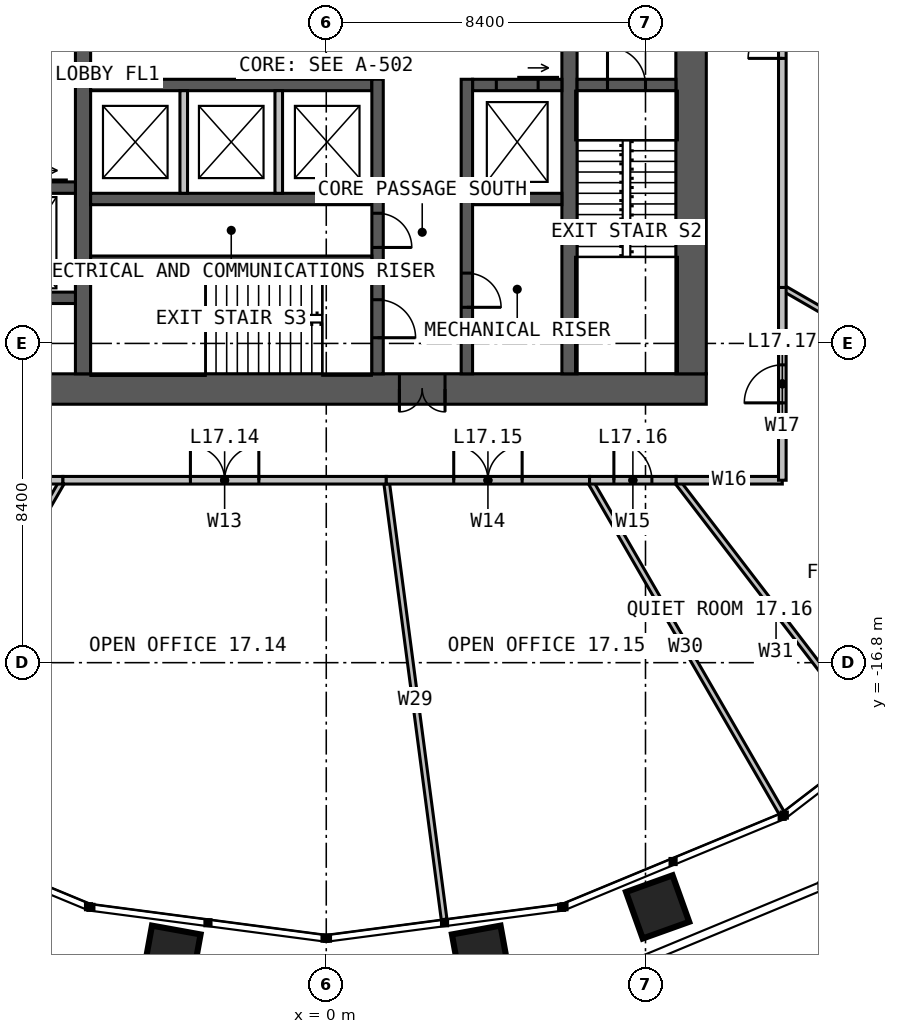
"""IFC4 building model, lengths in metres.
Left out: names, types, materials, properties, quantities, classifications, styles, units other than length and angle.
Written with IfcOpenShell. Run it as: python <this file> out.ifc"""

import sys

from ifc_helpers import new_model, si_unit, direction, frame, frame_2d, origin, place, context, subcontext, project, spatial, rectangle, extrude, element, fill, save


model = new_model("IFC4")
c1 = context("Model", 3, precision=1e-05, world=origin(), true_north=direction((0.0, 1.0)))
c2 = subcontext(c1, "Body", "Model", "MODEL_VIEW")
j1 = project(units=[si_unit("LENGTHUNIT", "METRE"), si_unit("PLANEANGLEUNIT", "RADIAN")], contexts=[c1])
p1 = place(None, origin())
s1 = spatial("IfcSite", under=j1, at=p1, CompositionType="ELEMENT")
p2 = place(p1, origin())
s2 = spatial("IfcBuilding", under=s1, at=p2, CompositionType="ELEMENT")
p3 = place(p2, frame((0.0, 0.0, 73.0)))
s3 = spatial("IfcBuildingStorey", under=s2, at=p3, CompositionType="ELEMENT", Elevation=73.0)
p4 = place(p3, frame((10.0, -9.6, 0.0), z_axis=(0.0, 0.0, 1.0), x_axis=(-1.0, 0.0, 0.0)))
e1 = element("IfcWall", 1, at=p4, inside=s3, PredefinedType="SOLIDWALL", context=c2, shape_type="SweptSolid", body=[
    extrude(rectangle(XDim=20.0, YDim=0.8, at=frame_2d((10.0, 0.0))), origin(), (0.0, 0.0, 1.0), 4.0),
])
p5 = place(p4, frame((6.875, 0.0, 0.0)))
e2 = element("IfcOpeningElement", 2, at=p5, cuts=e1, PredefinedType="OPENING", context=c2, shape_type="SweptSolid", body=[
    extrude(rectangle(XDim=1.2, YDim=2.2, at=frame_2d((0.6, 1.1))), frame((0.0, 0.41, 0.0), z_axis=(0.0, -1.0, 0.0), x_axis=(1.0, 0.0, 0.0)), (0.0, 0.0, 1.0), 0.82),
])
p6 = place(p3, frame((9.6, -9.2, 0.0), z_axis=(0.0, 0.0, 1.0), x_axis=(0.0, 1.0, 0.0)))
e3 = element("IfcWall", 3, at=p6, inside=s3, PredefinedType="SOLIDWALL", context=c2, shape_type="SweptSolid", body=[
    extrude(rectangle(XDim=18.4, YDim=0.8, at=frame_2d((9.2, 0.0))), origin(), (0.0, 0.0, 1.0), 4.0),
])
p7 = place(p3, frame((-6.4, -9.2, 0.0), z_axis=(0.0, 0.0, 1.0), x_axis=(0.0, 1.0, 0.0)))
e4 = element("IfcWall", 4, at=p7, inside=s3, PredefinedType="SOLIDWALL", context=c2, shape_type="SweptSolid", body=[
    extrude(rectangle(XDim=18.4, YDim=0.4, at=frame_2d((9.2, 0.0))), origin(), (0.0, 0.0, 1.0), 4.0),
])
p8 = place(p7, frame((8.7, 0.0, 0.0)))
e5 = element("IfcOpeningElement", 5, at=p8, cuts=e4, PredefinedType="OPENING", context=c2, shape_type="SweptSolid", body=[
    extrude(rectangle(XDim=1.0, YDim=2.2, at=frame_2d((0.5, 1.1))), frame((0.0, 0.21, 0.0), z_axis=(0.0, -1.0, 0.0), x_axis=(1.0, 0.0, 0.0)), (0.0, 0.0, 1.0), 0.42),
])
p9 = place(p3, frame((6.4, 9.2, 0.0), z_axis=(0.0, 0.0, 1.0), x_axis=(0.0, -1.0, 0.0)))
e6 = element("IfcWall", 6, at=p9, inside=s3, PredefinedType="SOLIDWALL", context=c2, shape_type="SweptSolid", body=[
    extrude(rectangle(XDim=18.4, YDim=0.4, at=frame_2d((9.2, 0.0))), origin(), (0.0, 0.0, 1.0), 4.0),
])
p10 = place(p9, frame((8.7, 0.0, 0.0)))
e7 = element("IfcOpeningElement", 7, at=p10, cuts=e6, PredefinedType="OPENING", context=c2, shape_type="SweptSolid", body=[
    extrude(rectangle(XDim=1.0, YDim=2.2, at=frame_2d((0.5, 1.1))), frame((0.0, 0.21, 0.0), z_axis=(0.0, -1.0, 0.0), x_axis=(1.0, 0.0, 0.0)), (0.0, 0.0, 1.0), 0.42),
])
p11 = place(p3, frame((-6.2, -1.6, 0.0), z_axis=(0.0, 0.0, 1.0), x_axis=(1.0, 0.0, 0.0)))
e8 = element("IfcWall", 8, at=p11, inside=s3, PredefinedType="SOLIDWALL", context=c2, shape_type="SweptSolid", body=[
    extrude(rectangle(XDim=7.4, YDim=0.3, at=frame_2d((3.7, 0.0))), origin(), (0.0, 0.0, 1.0), 4.0),
])
p12 = place(p3, frame((3.85, -1.6, 0.0), z_axis=(0.0, 0.0, 1.0), x_axis=(1.0, 0.0, 0.0)))
e9 = element("IfcWall", 9, at=p12, inside=s3, PredefinedType="SOLIDWALL", context=c2, shape_type="SweptSolid", body=[
    extrude(rectangle(XDim=2.35, YDim=0.3, at=frame_2d((1.175, 0.0))), origin(), (0.0, 0.0, 1.0), 4.0),
])
p13 = place(p12, frame((0.625, 0.0, 0.0)))
e10 = element("IfcOpeningElement", 10, at=p13, cuts=e9, PredefinedType="OPENING", context=c2, shape_type="SweptSolid", body=[
    extrude(rectangle(XDim=1.1, YDim=2.2, at=frame_2d((0.55, 1.1))), frame((0.0, 0.16, 0.0), z_axis=(0.0, -1.0, 0.0), x_axis=(1.0, 0.0, 0.0)), (0.0, 0.0, 1.0), 0.32),
])
p14 = place(p3, frame((-6.2, -4.6, 0.0), z_axis=(0.0, 0.0, 1.0), x_axis=(1.0, 0.0, 0.0)))
e11 = element("IfcWall", 11, at=p14, inside=s3, PredefinedType="SOLIDWALL", context=c2, shape_type="SweptSolid", body=[
    extrude(rectangle(XDim=7.4, YDim=0.3, at=frame_2d((3.7, 0.0))), origin(), (0.0, 0.0, 1.0), 4.0),
])
p15 = place(p3, frame((3.85, -4.6, 0.0), z_axis=(0.0, 0.0, 1.0), x_axis=(1.0, 0.0, 0.0)))
e12 = element("IfcWall", 12, at=p15, inside=s3, PredefinedType="SOLIDWALL", context=c2, shape_type="SweptSolid", body=[
    extrude(rectangle(XDim=2.35, YDim=0.3, at=frame_2d((1.175, 0.0))), origin(), (0.0, 0.0, 1.0), 4.0),
])
p16 = place(p3, frame((1.35, -1.45, 0.0), z_axis=(0.0, 0.0, 1.0), x_axis=(0.0, -1.0, 0.0)))
e13 = element("IfcWall", 13, at=p16, inside=s3, PredefinedType="SOLIDWALL", context=c2, shape_type="SweptSolid", body=[
    extrude(rectangle(XDim=7.75, YDim=0.3, at=frame_2d((3.875, 0.0))), origin(), (0.0, 0.0, 1.0), 4.0),
])
p17 = place(p16, frame((5.8, 0.0, 0.0)))
e14 = element("IfcOpeningElement", 14, at=p17, cuts=e13, PredefinedType="OPENING", context=c2, shape_type="SweptSolid", body=[
    extrude(rectangle(XDim=1.0, YDim=2.2, at=frame_2d((0.5, 1.1))), frame((0.0, 0.16, 0.0), z_axis=(0.0, -1.0, 0.0), x_axis=(1.0, 0.0, 0.0)), (0.0, 0.0, 1.0), 0.32),
])
p18 = place(p16, frame((3.525, 0.0, 0.0)))
e15 = element("IfcOpeningElement", 15, at=p18, cuts=e13, PredefinedType="OPENING", context=c2, shape_type="SweptSolid", body=[
    extrude(rectangle(XDim=0.9, YDim=2.2, at=frame_2d((0.45, 1.1))), frame((0.0, 0.16, 0.0), z_axis=(0.0, -1.0, 0.0), x_axis=(1.0, 0.0, 0.0)), (0.0, 0.0, 1.0), 0.32),
])
p19 = place(p3, frame((3.7, -1.45, 0.0), z_axis=(0.0, 0.0, 1.0), x_axis=(0.0, -1.0, 0.0)))
e16 = element("IfcWall", 16, at=p19, inside=s3, PredefinedType="SOLIDWALL", context=c2, shape_type="SweptSolid", body=[
    extrude(rectangle(XDim=7.75, YDim=0.3, at=frame_2d((3.875, 0.0))), origin(), (0.0, 0.0, 1.0), 4.0),
])
p20 = place(p19, frame((5.1, 0.0, 0.0)))
e17 = element("IfcOpeningElement", 17, at=p20, cuts=e16, PredefinedType="OPENING", context=c2, shape_type="SweptSolid", body=[
    extrude(rectangle(XDim=0.9, YDim=2.2, at=frame_2d((0.45, 1.1))), frame((0.0, 0.16, 0.0), z_axis=(0.0, -1.0, 0.0), x_axis=(1.0, 0.0, 0.0)), (0.0, 0.0, 1.0), 0.32),
])
p21 = place(p3, frame((-6.2, -6.2, 0.0), z_axis=(0.0, 0.0, 1.0), x_axis=(1.0, 0.0, 0.0)))
e18 = element("IfcWall", 18, at=p21, inside=s3, PredefinedType="SOLIDWALL", context=c2, shape_type="SweptSolid", body=[
    extrude(rectangle(XDim=7.4, YDim=0.2, at=frame_2d((3.7, 0.0))), origin(), (0.0, 0.0, 1.0), 4.0),
])
p22 = place(p3, frame((6.6, -1.6, 0.0), z_axis=(0.0, 0.0, 1.0), x_axis=(1.0, 0.0, 0.0)))
e19 = element("IfcWall", 19, at=p22, inside=s3, PredefinedType="SOLIDWALL", context=c2, shape_type="SweptSolid", body=[
    extrude(rectangle(XDim=2.6, YDim=0.3, at=frame_2d((1.3, 0.0))), origin(), (0.0, 0.0, 1.0), 4.0),
])
p23 = place(p22, frame((0.8, 0.0, 0.0)))
e20 = element("IfcOpeningElement", 20, at=p23, cuts=e19, PredefinedType="OPENING", context=c2, shape_type="SweptSolid", body=[
    extrude(rectangle(XDim=1.0, YDim=2.2, at=frame_2d((0.5, 1.1))), frame((0.0, 0.16, 0.0), z_axis=(0.0, -1.0, 0.0), x_axis=(1.0, 0.0, 0.0)), (0.0, 0.0, 1.0), 0.32),
])
p24 = place(p3, frame((-9.2, -4.3, 0.0), z_axis=(0.0, 0.0, 1.0), x_axis=(1.0, 0.0, 0.0)))
e21 = element("IfcWall", 21, at=p24, inside=s3, PredefinedType="SOLIDWALL", context=c2, shape_type="SweptSolid", body=[
    extrude(rectangle(XDim=2.6, YDim=0.3, at=frame_2d((1.3, 0.0))), origin(), (0.0, 0.0, 1.0), 4.0),
])
p25 = place(p24, frame((0.75, 0.0, 0.0)))
e22 = element("IfcOpeningElement", 22, at=p25, cuts=e21, PredefinedType="OPENING", context=c2, shape_type="SweptSolid", body=[
    extrude(rectangle(XDim=1.1, YDim=2.2, at=frame_2d((0.55, 1.1))), frame((0.0, 0.16, 0.0), z_axis=(0.0, -1.0, 0.0), x_axis=(1.0, 0.0, 0.0)), (0.0, 0.0, 1.0), 0.32),
])
p26 = place(p3, frame((-9.2, -7.2, 0.0), z_axis=(0.0, 0.0, 1.0), x_axis=(1.0, 0.0, 0.0)))
e23 = element("IfcWall", 23, at=p26, inside=s3, PredefinedType="SOLIDWALL", context=c2, shape_type="SweptSolid", body=[
    extrude(rectangle(XDim=2.6, YDim=0.3, at=frame_2d((1.3, 0.0))), origin(), (0.0, 0.0, 1.0), 4.0),
])
for number, where, z_axis, x_axis in (
    (24, (-3.75, -1.75, 0.0), (0.0, 0.0, 1.0), (0.0, -1.0, 0.0)),
    (25, (-1.25, -1.75, 0.0), (0.0, 0.0, 1.0), (0.0, -1.0, 0.0)),
):
    element("IfcWall", number, at=place(p3, frame(where, z_axis=z_axis, x_axis=x_axis)), inside=s3, PredefinedType="SOLIDWALL", context=c2, shape_type="SweptSolid", body=[
        extrude(rectangle(XDim=2.7, YDim=0.2, at=frame_2d((1.35, 0.0))), origin(), (0.0, 0.0, 1.0), 3.75),
    ])
for number, where, z_axis, x_axis in (
    (26, (12.0, -6.928, 0.0), (0.0, 0.0, 1.0), (0.866, -0.5, 0.0)),
    (27, (-6.928, -12.0, 0.0), (0.0, 0.0, 1.0), (-0.5, -0.866, 0.0)),
):
    element("IfcWall", number, at=place(p3, frame(where, z_axis=z_axis, x_axis=x_axis)), inside=s3, PredefinedType="PARTITIONING", context=c2, shape_type="SweptSolid", body=[
        extrude(rectangle(XDim=10.106, YDim=0.15, at=frame_2d((5.053, 0.0))), origin(), (0.0, 0.0, 1.0), 2.79),
    ])
p27 = place(p3, frame((1.58, -12.0, 0.0), z_axis=(0.0, 0.0, 1.0), x_axis=(0.130516833846, -0.991446093382, 0.0)))
e28 = element("IfcWall", 28, at=p27, inside=s3, PredefinedType="PARTITIONING", context=c2, shape_type="SweptSolid", body=[
    extrude(rectangle(XDim=11.654, YDim=0.15, at=frame_2d((5.827, 0.0))), origin(), (0.0, 0.0, 1.0), 2.79),
])
p28 = place(p3, frame((6.928, -12.0, 0.0), z_axis=(0.0, 0.0, 1.0), x_axis=(0.500002673408, -0.866023860286, 0.0)))
e29 = element("IfcWall", 29, at=p28, inside=s3, PredefinedType="PARTITIONING", context=c2, shape_type="SweptSolid", body=[
    extrude(rectangle(XDim=10.106, YDim=0.15, at=frame_2d((5.053, 0.0))), origin(), (0.0, 0.0, 1.0), 2.79),
])
p29 = place(p3, frame((9.208, -12.0, 0.0), z_axis=(0.0, 0.0, 1.0), x_axis=(0.608747993403, -0.793363649613, 0.0)))
e30 = element("IfcWall", 30, at=p29, inside=s3, PredefinedType="PARTITIONING", context=c2, shape_type="SweptSolid", body=[
    extrude(rectangle(XDim=8.632, YDim=0.15, at=frame_2d((4.316, 0.0))), origin(), (0.0, 0.0, 1.0), 2.79),
])
p30 = place(p3, frame((12.0, -6.928, 0.0), z_axis=(0.0, 0.0, 1.0), x_axis=(0.0, 1.0, 0.0)))
e31 = element("IfcWall", 31, at=p30, inside=s3, PredefinedType="PARTITIONING", context=c2, shape_type="SweptSolid", body=[
    extrude(rectangle(XDim=13.856, YDim=0.2, at=frame_2d((6.928, 0.0))), origin(), (0.0, 0.0, 1.0), 3.8),
])
p31 = place(p30, frame((6.028, 0.0, 0.0)))
e32 = element("IfcOpeningElement", 32, at=p31, cuts=e31, PredefinedType="OPENING", context=c2, shape_type="SweptSolid", body=[
    extrude(rectangle(XDim=1.8, YDim=2.2, at=frame_2d((0.9, 1.1))), frame((0.0, 0.11, 0.0), z_axis=(0.0, -1.0, 0.0), x_axis=(1.0, 0.0, 0.0)), (0.0, 0.0, 1.0), 0.22),
])
p32 = place(p3, frame((-12.0, -12.0, 0.0), z_axis=(0.0, 0.0, 1.0), x_axis=(1.0, 0.0, 0.0)))
e33 = element("IfcWall", 33, at=p32, inside=s3, PredefinedType="PARTITIONING", context=c2, shape_type="SweptSolid", body=[
    extrude(rectangle(XDim=5.072, YDim=0.2, at=frame_2d((2.536, 0.0))), origin(), (0.0, 0.0, 1.0), 3.8),
])
p33 = place(p32, frame((2.036, 0.0, 0.0)))
e34 = element("IfcOpeningElement", 34, at=p33, cuts=e33, PredefinedType="OPENING", context=c2, shape_type="SweptSolid", body=[
    extrude(rectangle(XDim=1.0, YDim=2.2, at=frame_2d((0.5, 1.1))), frame((0.0, 0.11, 0.0), z_axis=(0.0, -1.0, 0.0), x_axis=(1.0, 0.0, 0.0)), (0.0, 0.0, 1.0), 0.22),
])
p34 = place(p3, frame((-6.928, -12.0, 0.0), z_axis=(0.0, 0.0, 1.0), x_axis=(1.0, 0.0, 0.0)))
e35 = element("IfcWall", 35, at=p34, inside=s3, PredefinedType="PARTITIONING", context=c2, shape_type="SweptSolid", body=[
    extrude(rectangle(XDim=8.508, YDim=0.2, at=frame_2d((4.254, 0.0))), origin(), (0.0, 0.0, 1.0), 3.8),
])
p35 = place(p34, frame((3.354, 0.0, 0.0)))
e36 = element("IfcOpeningElement", 36, at=p35, cuts=e35, PredefinedType="OPENING", context=c2, shape_type="SweptSolid", body=[
    extrude(rectangle(XDim=1.8, YDim=2.2, at=frame_2d((0.9, 1.1))), frame((0.0, 0.11, 0.0), z_axis=(0.0, -1.0, 0.0), x_axis=(1.0, 0.0, 0.0)), (0.0, 0.0, 1.0), 0.22),
])
p36 = place(p3, frame((1.58, -12.0, 0.0), z_axis=(0.0, 0.0, 1.0), x_axis=(1.0, 0.0, 0.0)))
e37 = element("IfcWall", 37, at=p36, inside=s3, PredefinedType="PARTITIONING", context=c2, shape_type="SweptSolid", body=[
    extrude(rectangle(XDim=5.348, YDim=0.2, at=frame_2d((2.674, 0.0))), origin(), (0.0, 0.0, 1.0), 3.8),
])
p37 = place(p36, frame((1.774, 0.0, 0.0)))
e38 = element("IfcOpeningElement", 38, at=p37, cuts=e37, PredefinedType="OPENING", context=c2, shape_type="SweptSolid", body=[
    extrude(rectangle(XDim=1.8, YDim=2.2, at=frame_2d((0.9, 1.1))), frame((0.0, 0.11, 0.0), z_axis=(0.0, -1.0, 0.0), x_axis=(1.0, 0.0, 0.0)), (0.0, 0.0, 1.0), 0.22),
])
p38 = place(p3, frame((6.928, -12.0, 0.0), z_axis=(0.0, 0.0, 1.0), x_axis=(1.0, 0.0, 0.0)))
e39 = element("IfcWall", 39, at=p38, inside=s3, PredefinedType="PARTITIONING", context=c2, shape_type="SweptSolid", body=[
    extrude(rectangle(XDim=2.28, YDim=0.2, at=frame_2d((1.14, 0.0))), origin(), (0.0, 0.0, 1.0), 3.8),
])
p39 = place(p38, frame((0.64, 0.0, 0.0)))
e40 = element("IfcOpeningElement", 40, at=p39, cuts=e39, PredefinedType="OPENING", context=c2, shape_type="SweptSolid", body=[
    extrude(rectangle(XDim=1.0, YDim=2.2, at=frame_2d((0.5, 1.1))), frame((0.0, 0.11, 0.0), z_axis=(0.0, -1.0, 0.0), x_axis=(1.0, 0.0, 0.0)), (0.0, 0.0, 1.0), 0.22),
])
p40 = place(p3, frame((9.208, -12.0, 0.0), z_axis=(0.0, 0.0, 1.0), x_axis=(1.0, 0.0, 0.0)))
e41 = element("IfcWall", 41, at=p40, inside=s3, PredefinedType="PARTITIONING", context=c2, shape_type="SweptSolid", body=[
    extrude(rectangle(XDim=2.792, YDim=0.2, at=frame_2d((1.396, 0.0))), origin(), (0.0, 0.0, 1.0), 3.8),
])
p41 = place(p3, frame((12.0, -12.0, 0.0), z_axis=(0.0, 0.0, 1.0), x_axis=(0.0, 1.0, 0.0)))
e42 = element("IfcWall", 42, at=p41, inside=s3, PredefinedType="PARTITIONING", context=c2, shape_type="SweptSolid", body=[
    extrude(rectangle(XDim=5.072, YDim=0.2, at=frame_2d((2.536, 0.0))), origin(), (0.0, 0.0, 1.0), 3.8),
])
p42 = place(p41, frame((2.036, 0.0, 0.0)))
e43 = element("IfcOpeningElement", 43, at=p42, cuts=e42, PredefinedType="OPENING", context=c2, shape_type="SweptSolid", body=[
    extrude(rectangle(XDim=1.0, YDim=2.2, at=frame_2d((0.5, 1.1))), frame((0.0, 0.11, 0.0), z_axis=(0.0, -1.0, 0.0), x_axis=(1.0, 0.0, 0.0)), (0.0, 0.0, 1.0), 0.22),
])
p43 = place(p5, origin())
e44 = element("IfcDoor", 44, at=p43, inside=s3, OperationType="DOUBLE_DOOR_SINGLE_SWING", PredefinedType="DOOR", context=c2, shape_type="SweptSolid", body=[
    extrude(rectangle(XDim=1.2, YDim=2.2, at=frame_2d((0.6, 1.1))), frame((0.0, 0.025, 0.0), z_axis=(0.0, -1.0, 0.0), x_axis=(1.0, 0.0, 0.0)), (0.0, 0.0, 1.0), 0.05),
])
fill(e2, e44)
p44 = place(p23, origin())
e45 = element("IfcDoor", 45, at=p44, inside=s3, OperationType="SINGLE_SWING_LEFT", PredefinedType="DOOR", context=c2, shape_type="SweptSolid", body=[
    extrude(rectangle(XDim=1.0, YDim=2.2, at=frame_2d((0.5, 1.1))), frame((0.0, 0.025, 0.0), z_axis=(0.0, -1.0, 0.0), x_axis=(1.0, 0.0, 0.0)), (0.0, 0.0, 1.0), 0.05),
])
fill(e20, e45)
p45 = place(p17, origin())
e46 = element("IfcDoor", 46, at=p45, inside=s3, OperationType="SINGLE_SWING_RIGHT", PredefinedType="DOOR", context=c2, shape_type="SweptSolid", body=[
    extrude(rectangle(XDim=1.0, YDim=2.2, at=frame_2d((0.5, 1.1))), frame((0.0, 0.025, 0.0), z_axis=(0.0, -1.0, 0.0), x_axis=(1.0, 0.0, 0.0)), (0.0, 0.0, 1.0), 0.05),
])
fill(e14, e46)
p46 = place(p18, origin())
e47 = element("IfcDoor", 47, at=p46, inside=s3, OperationType="SINGLE_SWING_RIGHT", PredefinedType="DOOR", context=c2, shape_type="SweptSolid", body=[
    extrude(rectangle(XDim=0.9, YDim=2.2, at=frame_2d((0.45, 1.1))), frame((0.0, 0.025, 0.0), z_axis=(0.0, -1.0, 0.0), x_axis=(1.0, 0.0, 0.0)), (0.0, 0.0, 1.0), 0.05),
])
fill(e15, e47)
p47 = place(p20, origin())
e48 = element("IfcDoor", 48, at=p47, inside=s3, OperationType="SINGLE_SWING_RIGHT", PredefinedType="DOOR", context=c2, shape_type="SweptSolid", body=[
    extrude(rectangle(XDim=0.9, YDim=2.2, at=frame_2d((0.45, 1.1))), frame((0.0, 0.025, 0.0), z_axis=(0.0, -1.0, 0.0), x_axis=(1.0, 0.0, 0.0)), (0.0, 0.0, 1.0), 0.05),
])
fill(e17, e48)
p48 = place(p13, origin())
e49 = element("IfcDoor", 49, at=p48, inside=s3, OperationType="SLIDING_TO_LEFT", PredefinedType="DOOR", context=c2, shape_type="SweptSolid", body=[
    extrude(rectangle(XDim=1.1, YDim=2.2, at=frame_2d((0.55, 1.1))), frame((0.0, 0.025, 0.0), z_axis=(0.0, -1.0, 0.0), x_axis=(1.0, 0.0, 0.0)), (0.0, 0.0, 1.0), 0.05),
])
fill(e10, e49)
p49 = place(p31, origin())
e50 = element("IfcDoor", 50, at=p49, inside=s3, OperationType="DOUBLE_DOOR_SINGLE_SWING", PredefinedType="DOOR", context=c2, shape_type="SweptSolid", body=[
    extrude(rectangle(XDim=1.8, YDim=2.2, at=frame_2d((0.9, 1.1))), frame((0.0, 0.025, 0.0), z_axis=(0.0, -1.0, 0.0), x_axis=(1.0, 0.0, 0.0)), (0.0, 0.0, 1.0), 0.05),
])
fill(e32, e50)
p50 = place(p35, origin())
e51 = element("IfcDoor", 51, at=p50, inside=s3, OperationType="DOUBLE_DOOR_SINGLE_SWING", PredefinedType="DOOR", context=c2, shape_type="SweptSolid", body=[
    extrude(rectangle(XDim=1.8, YDim=2.2, at=frame_2d((0.9, 1.1))), frame((0.0, 0.025, 0.0), z_axis=(0.0, -1.0, 0.0), x_axis=(1.0, 0.0, 0.0)), (0.0, 0.0, 1.0), 0.05),
])
fill(e36, e51)
p51 = place(p37, origin())
e52 = element("IfcDoor", 52, at=p51, inside=s3, OperationType="DOUBLE_DOOR_SINGLE_SWING", PredefinedType="DOOR", context=c2, shape_type="SweptSolid", body=[
    extrude(rectangle(XDim=1.8, YDim=2.2, at=frame_2d((0.9, 1.1))), frame((0.0, 0.025, 0.0), z_axis=(0.0, -1.0, 0.0), x_axis=(1.0, 0.0, 0.0)), (0.0, 0.0, 1.0), 0.05),
])
fill(e38, e52)
p52 = place(p39, origin())
e53 = element("IfcDoor", 53, at=p52, inside=s3, OperationType="SINGLE_SWING_LEFT", PredefinedType="DOOR", context=c2, shape_type="SweptSolid", body=[
    extrude(rectangle(XDim=1.0, YDim=2.2, at=frame_2d((0.5, 1.1))), frame((0.0, 0.025, 0.0), z_axis=(0.0, -1.0, 0.0), x_axis=(1.0, 0.0, 0.0)), (0.0, 0.0, 1.0), 0.05),
])
fill(e40, e53)
p53 = place(p42, origin())
e54 = element("IfcDoor", 54, at=p53, inside=s3, OperationType="SINGLE_SWING_LEFT", PredefinedType="DOOR", context=c2, shape_type="SweptSolid", body=[
    extrude(rectangle(XDim=1.0, YDim=2.2, at=frame_2d((0.5, 1.1))), frame((0.0, 0.025, 0.0), z_axis=(0.0, -1.0, 0.0), x_axis=(1.0, 0.0, 0.0)), (0.0, 0.0, 1.0), 0.05),
])
fill(e43, e54)
save(model, sys.argv[1])
